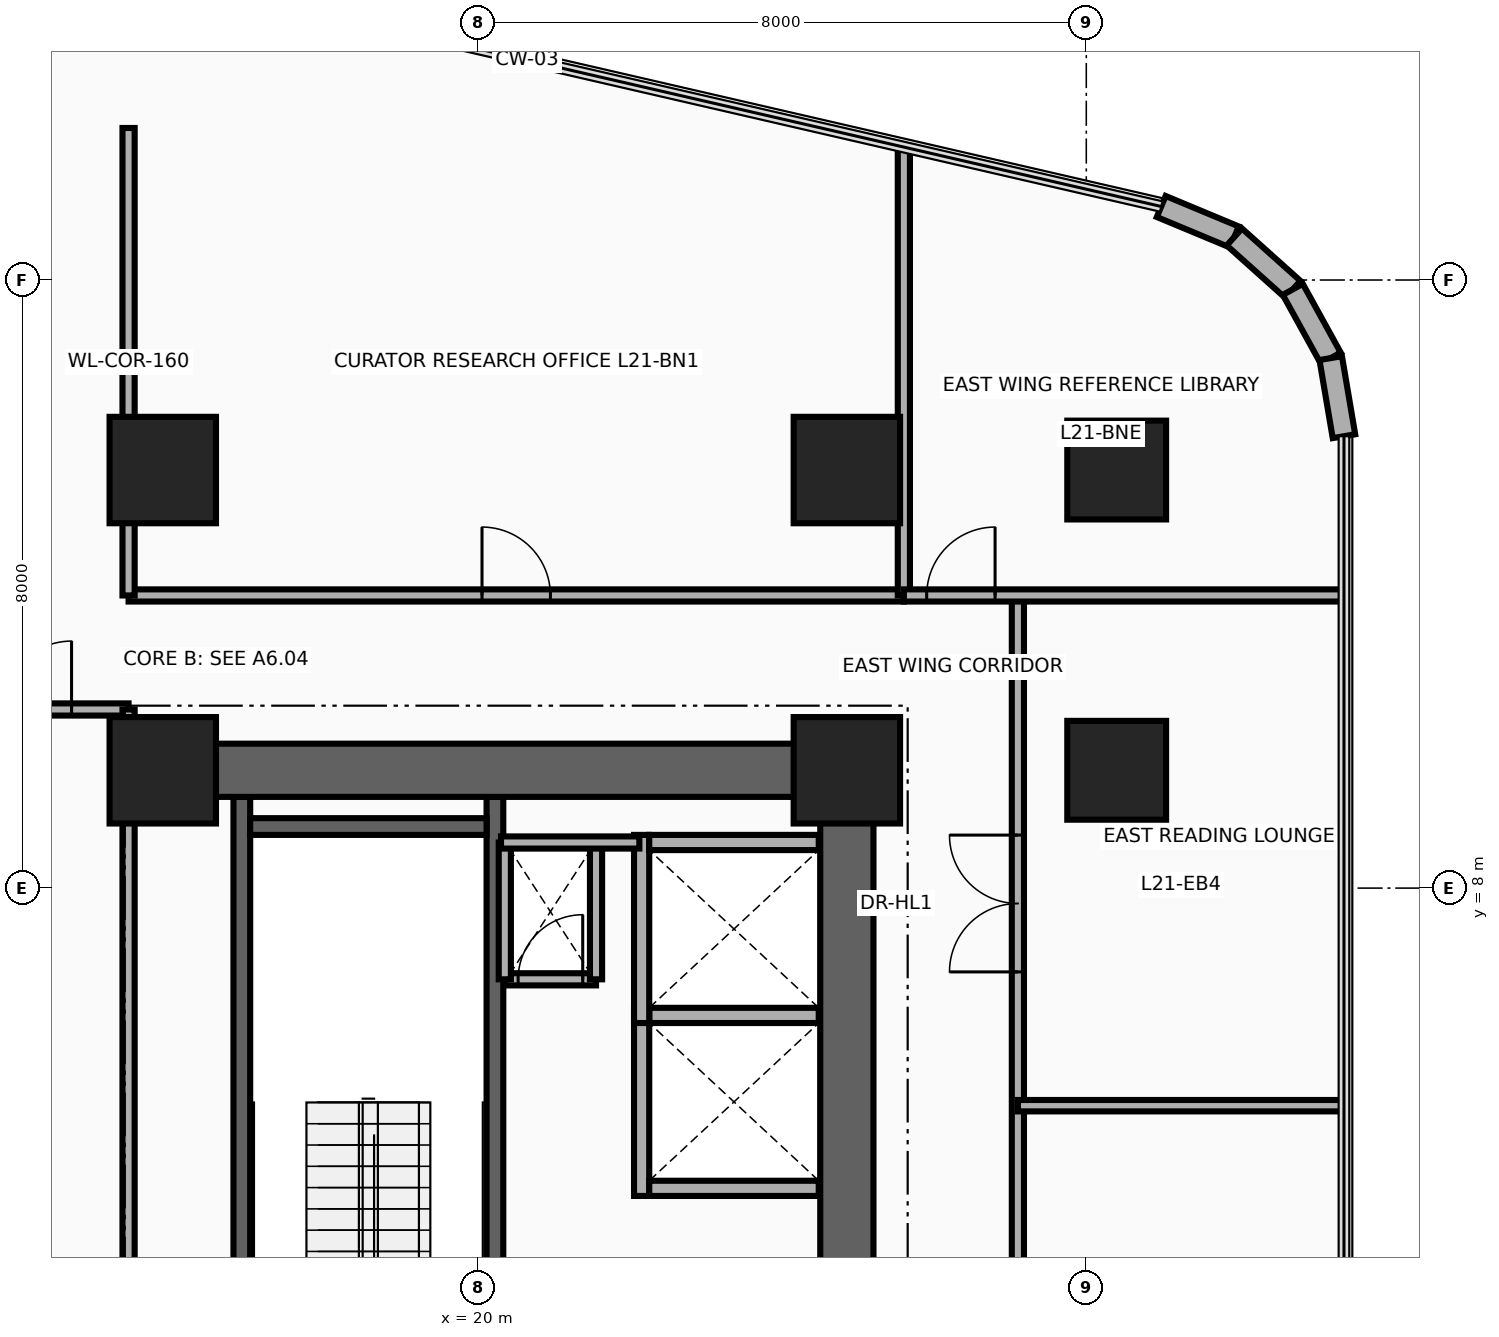
"""IFC4 building model, lengths in metres.
Left out: names, types, materials, properties, quantities, classifications, styles, units other than length and angle.
Written with IfcOpenShell. Run it as: python <this file> out.ifc"""

import sys

from ifc_helpers import new_model, si_unit, direction, frame, frame_2d, origin, origin_2d, place, context, subcontext, project, spatial, rectangle, circle, extrude, source, transform, mapped, element, fill, save


model = new_model("IFC4")
c1 = context("Model", 3, precision=1e-05, world=origin(), true_north=direction((0.0, 1.0)))
c2 = subcontext(c1, "Body", "Model", "MODEL_VIEW")
j1 = project(units=[si_unit("LENGTHUNIT", "METRE"), si_unit("PLANEANGLEUNIT", "RADIAN")], contexts=[c1])
p1 = place(None, origin())
s1 = spatial("IfcSite", under=j1, at=p1, CompositionType="ELEMENT")
p2 = place(p1, origin())
s2 = spatial("IfcBuilding", under=s1, at=p2, CompositionType="ELEMENT")
p3 = place(p2, frame((0.0, 0.0, 85.2)))
s3 = spatial("IfcBuildingStorey", under=s2, at=p3, CompositionType="ELEMENT", Elevation=85.2)
for number, where, z_axis, x_axis in (
    (1, (16.89, 0.68, 0.0), (0.0, 0.0, 1.0), (0.0, 1.0, 0.0)),
    (2, (20.22, 0.68, 0.0), (0.0, 0.0, 1.0), (0.0, 1.0, 0.0)),
):
    element("IfcWall", number, at=place(p3, frame(where, z_axis=z_axis, x_axis=x_axis)), inside=s3, PredefinedType="SHEAR", context=c2, shape_type="SweptSolid", body=[
        extrude(rectangle(XDim=8.52, YDim=0.22, at=frame_2d((4.26, 0.0))), origin(), (0.0, 0.0, 1.0), 3.46),
    ])
p4 = place(p3, frame((17.0, 8.81, 0.0), z_axis=(0.0, 0.0, 1.0), x_axis=(1.0, 0.0, 0.0)))
e3 = element("IfcWall", 3, at=p4, inside=s3, PredefinedType="SHEAR", context=c2, shape_type="SweptSolid", body=[
    extrude(rectangle(XDim=3.11, YDim=0.22, at=frame_2d((1.555, 0.0))), origin(), (0.0, 0.0, 1.0), 3.46),
])
p5 = place(p3, frame((24.85, 0.95, 0.0), z_axis=(0.0, 0.0, 1.0), x_axis=(0.0, 1.0, 0.0)))
e4 = element("IfcWall", 4, at=p5, inside=s3, PredefinedType="SHEAR", context=c2, shape_type="SweptSolid", body=[
    extrude(rectangle(XDim=8.95, YDim=0.7, at=frame_2d((4.475, 0.0))), origin(), (0.0, 0.0, 1.0), 3.46),
])
p6 = place(p3, frame((15.85, 9.55, 0.0), z_axis=(0.0, 0.0, 1.0), x_axis=(1.0, 0.0, 0.0)))
e5 = element("IfcWall", 5, at=p6, inside=s3, PredefinedType="SHEAR", context=c2, shape_type="SweptSolid", body=[
    extrude(rectangle(XDim=9.0, YDim=0.7, at=frame_2d((4.5, 0.0))), origin(), (0.0, 0.0, 1.0), 3.46),
])
m1 = source(origin(), c2, "Body", "SweptSolid", [
    extrude(rectangle(XDim=1.4, YDim=1.4, at=origin_2d()), origin(), (0.0, 0.0, 1.0), 3.7),
])
for number, where, z_axis, x_axis in (
    (6, (15.85, 9.55, 0.0), (0.0, 0.0, 1.0), (1.0, 0.0, 0.0)),
    (7, (24.85, 9.55, 0.0), (0.0, 0.0, 1.0), (1.0, 0.0, 0.0)),
):
    element("IfcColumn", number, at=place(p3, frame(where, z_axis=z_axis, x_axis=x_axis)), inside=s3, PredefinedType="COLUMN", context=c2, shape_type="MappedRepresentation", body=[
        mapped(m1, transform((0.0, 0.0, 0.0), x_axis=(1.0, 0.0, 0.0), y_axis=(0.0, 1.0, 0.0), z_axis=(0.0, 0.0, 1.0), scale=1.0)),
    ])
m2 = source(origin(), c2, "Body", "SweptSolid", [
    extrude(circle(Radius=0.65, at=origin_2d()), origin(), (0.0, 0.0, 1.0), 3.7),
])
p7 = place(p3, frame((28.4, 9.55, 0.0), z_axis=(0.0, 0.0, 1.0), x_axis=(1.0, 0.0, 0.0)))
e8 = element("IfcColumn", 8, at=p7, inside=s3, PredefinedType="COLUMN", context=c2, shape_type="MappedRepresentation", body=[
    mapped(m2, transform((0.0, 0.0, 0.0), x_axis=(1.0, 0.0, 0.0), y_axis=(0.0, 1.0, 0.0), z_axis=(0.0, 0.0, 1.0), scale=1.0)),
])
for number, where, z_axis, x_axis in (
    (9, (15.85, 13.5, 0.0), (0.0, 0.0, 1.0), (1.0, 0.0, 0.0)),
    (10, (24.85, 13.5, 0.0), (0.0, 0.0, 1.0), (1.0, 0.0, 0.0)),
):
    element("IfcColumn", number, at=place(p3, frame(where, z_axis=z_axis, x_axis=x_axis)), inside=s3, PredefinedType="COLUMN", context=c2, shape_type="MappedRepresentation", body=[
        mapped(m1, transform((0.0, 0.0, 0.0), x_axis=(1.0, 0.0, 0.0), y_axis=(0.0, 1.0, 0.0), z_axis=(0.0, 0.0, 1.0), scale=1.0)),
    ])
p8 = place(p3, frame((28.4, 13.5, 0.0), z_axis=(0.0, 0.0, 1.0), x_axis=(1.0, 0.0, 0.0)))
e11 = element("IfcColumn", 11, at=p8, inside=s3, PredefinedType="COLUMN", context=c2, shape_type="MappedRepresentation", body=[
    mapped(m2, transform((0.0, 0.0, 0.0), x_axis=(1.0, 0.0, 0.0), y_axis=(0.0, 1.0, 0.0), z_axis=(0.0, 0.0, 1.0), scale=1.0)),
])
p9 = place(p3, frame((28.986, 16.967, 0.0), z_axis=(0.0, 0.0, 1.0), x_axis=(0.923083852684, -0.384598753136, 0.0)))
e12 = element("IfcWall", 12, at=p9, inside=s3, PredefinedType="SOLIDWALL", context=c2, shape_type="SweptSolid", body=[
    extrude(rectangle(XDim=1.042, YDim=0.3, at=frame_2d((0.521, 0.0))), origin(), (0.0, 0.0, 1.0), 3.46),
])
p10 = place(p3, frame((29.948, 16.566, 0.0), z_axis=(0.0, 0.0, 1.0), x_axis=(0.744585645533, -0.66752694063, 0.0)))
e13 = element("IfcWall", 13, at=p10, inside=s3, PredefinedType="SOLIDWALL", context=c2, shape_type="SweptSolid", body=[
    extrude(rectangle(XDim=1.033, YDim=0.3, at=frame_2d((0.517, 0.0))), origin(), (0.0, 0.0, 1.0), 3.46),
])
p11 = place(p3, frame((30.717, 15.877, 0.0), z_axis=(0.0, 0.0, 1.0), x_axis=(0.482971098131, -0.875636293429, 0.0)))
e14 = element("IfcWall", 14, at=p11, inside=s3, PredefinedType="SOLIDWALL", context=c2, shape_type="SweptSolid", body=[
    extrude(rectangle(XDim=1.033, YDim=0.3, at=frame_2d((0.516, 0.0))), origin(), (0.0, 0.0, 1.0), 3.46),
])
p12 = place(p3, frame((31.216, 14.973, 0.0), z_axis=(0.0, 0.0, 1.0), x_axis=(0.167019462117, -0.985953598946, 0.0)))
e15 = element("IfcWall", 15, at=p12, inside=s3, PredefinedType="SOLIDWALL", context=c2, shape_type="SweptSolid", body=[
    extrude(rectangle(XDim=1.042, YDim=0.3, at=frame_2d((0.521, 0.0))), origin(), (0.0, 0.0, 1.0), 3.46),
])
p13 = place(p3, frame((22.15, 3.95, 0.0), z_axis=(0.0, 0.0, 1.0), x_axis=(0.0, 1.0, 0.0)))
e16 = element("IfcWall", 16, at=p13, inside=s3, PredefinedType="MOVABLE", context=c2, shape_type="SweptSolid", body=[
    extrude(rectangle(XDim=2.475, YDim=0.2, at=frame_2d((1.238, 0.0))), origin(), (0.0, 0.0, 1.0), 3.46),
])
for number, where, z_axis, x_axis in (
    (17, (22.25, 4.05, 0.0), (0.0, 0.0, 1.0), (1.0, 0.0, 0.0)),
    (18, (22.25, 6.325, 0.0), (0.0, 0.0, 1.0), (1.0, 0.0, 0.0)),
):
    element("IfcWall", number, at=place(p3, frame(where, z_axis=z_axis, x_axis=x_axis)), inside=s3, PredefinedType="MOVABLE", context=c2, shape_type="SweptSolid", body=[
        extrude(rectangle(XDim=2.23, YDim=0.2, at=frame_2d((1.115, 0.0))), origin(), (0.0, 0.0, 1.0), 2.245),
    ])
p14 = place(p3, frame((22.15, 6.225, 0.0), z_axis=(0.0, 0.0, 1.0), x_axis=(0.0, 1.0, 0.0)))
e19 = element("IfcWall", 19, at=p14, inside=s3, PredefinedType="MOVABLE", context=c2, shape_type="SweptSolid", body=[
    extrude(rectangle(XDim=2.475, YDim=0.2, at=frame_2d((1.237, 0.0))), origin(), (0.0, 0.0, 1.0), 3.46),
])
p15 = place(p3, frame((22.25, 8.6, 0.0), z_axis=(0.0, 0.0, 1.0), x_axis=(1.0, 0.0, 0.0)))
e20 = element("IfcWall", 20, at=p15, inside=s3, PredefinedType="MOVABLE", context=c2, shape_type="SweptSolid", body=[
    extrude(rectangle(XDim=2.23, YDim=0.2, at=frame_2d((1.115, 0.0))), origin(), (0.0, 0.0, 1.0), 2.245),
])
p16 = place(p3, frame((20.35, 6.8, 0.0), z_axis=(0.0, 0.0, 1.0), x_axis=(1.0, 0.0, 0.0)))
e21 = element("IfcWall", 21, at=p16, inside=s3, PredefinedType="PARTITIONING", context=c2, shape_type="SweptSolid", body=[
    extrude(rectangle(XDim=1.2, YDim=0.16, at=frame_2d((0.6, 0.0))), origin(), (0.0, 0.0, 1.0), 3.46),
])
p17 = place(p16, frame((0.175, 0.0, 0.0)))
e22 = element("IfcOpeningElement", 22, at=p17, cuts=e21, PredefinedType="OPENING", context=c2, shape_type="SweptSolid", body=[
    extrude(rectangle(XDim=0.85, YDim=2.05, at=frame_2d((0.425, 1.025))), frame((0.0, 0.095, 0.0), z_axis=(0.0, -1.0, 0.0), x_axis=(1.0, 0.0, 0.0)), (0.0, 0.0, 1.0), 0.19),
])
for number, where, z_axis, x_axis in (
    (23, (21.55, 6.8, 0.0), (0.0, 0.0, 1.0), (0.0, 1.0, 0.0)),
    (24, (20.35, 6.8, 0.0), (0.0, 0.0, 1.0), (0.0, 1.0, 0.0)),
):
    element("IfcWall", number, at=place(p3, frame(where, z_axis=z_axis, x_axis=x_axis)), inside=s3, PredefinedType="PARTITIONING", context=c2, shape_type="SweptSolid", body=[
        extrude(rectangle(XDim=1.8, YDim=0.16, at=frame_2d((0.9, 0.0))), origin(), (0.0, 0.0, 1.0), 3.46),
    ])
p18 = place(p3, frame((20.3, 8.6, 0.0), z_axis=(0.0, 0.0, 1.0), x_axis=(1.0, 0.0, 0.0)))
e25 = element("IfcWall", 25, at=p18, inside=s3, PredefinedType="PARTITIONING", context=c2, shape_type="SweptSolid", body=[
    extrude(rectangle(XDim=1.82, YDim=0.16, at=frame_2d((0.91, 0.0))), origin(), (0.0, 0.0, 1.0), 3.46),
])
p19 = place(p3, frame((15.4, 11.85, 0.0), z_axis=(0.0, 0.0, 1.0), x_axis=(1.0, 0.0, 0.0)))
e26 = element("IfcWall", 26, at=p19, inside=s3, PredefinedType="PARTITIONING", context=c2, shape_type="SweptSolid", body=[
    extrude(rectangle(XDim=10.2, YDim=0.16, at=frame_2d((5.1, 0.0))), origin(), (0.0, 0.0, 1.0), 2.834),
])
p20 = place(p19, frame((4.65, 0.0, 0.0)))
e27 = element("IfcOpeningElement", 27, at=p20, cuts=e26, PredefinedType="OPENING", context=c2, shape_type="SweptSolid", body=[
    extrude(rectangle(XDim=0.9, YDim=2.1, at=frame_2d((0.45, 1.05))), frame((0.0, 0.095, 0.0), z_axis=(0.0, -1.0, 0.0), x_axis=(1.0, 0.0, 0.0)), (0.0, 0.0, 1.0), 0.19),
])
p21 = place(p3, frame((15.4, 11.85, 0.0), z_axis=(0.0, 0.0, 1.0), x_axis=(0.0, 1.0, 0.0)))
e28 = element("IfcWall", 28, at=p21, inside=s3, PredefinedType="PARTITIONING", context=c2, shape_type="SweptSolid", body=[
    extrude(rectangle(XDim=6.15, YDim=0.16, at=frame_2d((3.075, 0.0))), origin(), (0.0, 0.0, 1.0), 2.583),
])
p22 = place(p3, frame((25.6, 11.85, 0.0), z_axis=(0.0, 0.0, 1.0), x_axis=(0.0, 1.0, 0.0)))
e29 = element("IfcWall", 29, at=p22, inside=s3, PredefinedType="PARTITIONING", context=c2, shape_type="SweptSolid", body=[
    extrude(rectangle(XDim=5.898, YDim=0.16, at=frame_2d((2.949, 0.0))), origin(), (0.0, 0.0, 1.0), 2.583),
])
p23 = place(p3, frame((27.1, -13.89, 0.0), z_axis=(0.0, 0.0, 1.0), x_axis=(0.0, 1.0, 0.0)))
e30 = element("IfcWall", 30, at=p23, inside=s3, PredefinedType="PARTITIONING", context=c2, shape_type="SweptSolid", body=[
    extrude(rectangle(XDim=25.74, YDim=0.16, at=frame_2d((12.87, 0.0))), origin(), (0.0, 0.0, 1.0), 2.583),
])
p24 = place(p23, frame((2.351, 0.0, 0.0)))
e31 = element("IfcOpeningElement", 31, at=p24, cuts=e30, PredefinedType="OPENING", context=c2, shape_type="SweptSolid", body=[
    extrude(rectangle(XDim=0.9, YDim=2.1, at=frame_2d((0.45, 1.05))), frame((0.0, 0.095, 0.0), z_axis=(0.0, -1.0, 0.0), x_axis=(1.0, 0.0, 0.0)), (0.0, 0.0, 1.0), 0.19),
])
p25 = place(p23, frame((8.059, 0.0, 0.0)))
e32 = element("IfcOpeningElement", 32, at=p25, cuts=e30, PredefinedType="OPENING", context=c2, shape_type="SweptSolid", body=[
    extrude(rectangle(XDim=1.8, YDim=2.15, at=frame_2d((0.9, 1.075))), frame((0.0, 0.095, 0.0), z_axis=(0.0, -1.0, 0.0), x_axis=(1.0, 0.0, 0.0)), (0.0, 0.0, 1.0), 0.19),
])
p26 = place(p23, frame((14.771, 0.0, 0.0)))
e33 = element("IfcOpeningElement", 33, at=p26, cuts=e30, PredefinedType="OPENING", context=c2, shape_type="SweptSolid", body=[
    extrude(rectangle(XDim=1.8, YDim=2.15, at=frame_2d((0.9, 1.075))), frame((0.0, 0.095, 0.0), z_axis=(0.0, -1.0, 0.0), x_axis=(1.0, 0.0, 0.0)), (0.0, 0.0, 1.0), 0.19),
])
p27 = place(p23, frame((20.788, 0.0, 0.0)))
e34 = element("IfcOpeningElement", 34, at=p27, cuts=e30, PredefinedType="OPENING", context=c2, shape_type="SweptSolid", body=[
    extrude(rectangle(XDim=1.8, YDim=2.15, at=frame_2d((0.9, 1.075))), frame((0.0, 0.095, 0.0), z_axis=(0.0, -1.0, 0.0), x_axis=(1.0, 0.0, 0.0)), (0.0, 0.0, 1.0), 0.19),
])
p28 = place(p3, frame((25.6, 11.85, 0.0), z_axis=(0.0, 0.0, 1.0), x_axis=(1.0, 0.0, 0.0)))
e35 = element("IfcWall", 35, at=p28, inside=s3, PredefinedType="PARTITIONING", context=c2, shape_type="SweptSolid", body=[
    extrude(rectangle(XDim=5.79, YDim=0.16, at=frame_2d((2.895, 0.0))), origin(), (0.0, 0.0, 1.0), 2.896),
])
p29 = place(p28, frame((0.3, 0.0, 0.0)))
e36 = element("IfcOpeningElement", 36, at=p29, cuts=e35, PredefinedType="OPENING", context=c2, shape_type="SweptSolid", body=[
    extrude(rectangle(XDim=0.9, YDim=2.1, at=frame_2d((0.45, 1.05))), frame((0.0, 0.095, 0.0), z_axis=(0.0, -1.0, 0.0), x_axis=(1.0, 0.0, 0.0)), (0.0, 0.0, 1.0), 0.19),
])
p30 = place(p3, frame((27.1, 5.137, 0.0), z_axis=(0.0, 0.0, 1.0), x_axis=(1.0, 0.0, 0.0)))
e37 = element("IfcWall", 37, at=p30, inside=s3, PredefinedType="PARTITIONING", context=c2, shape_type="SweptSolid", body=[
    extrude(rectangle(XDim=4.29, YDim=0.15, at=frame_2d((2.145, 0.0))), origin(), (0.0, 0.0, 1.0), 2.896),
])
p31 = place(p3, frame((13.3, 10.35, 0.0), z_axis=(0.0, 0.0, 1.0), x_axis=(1.0, 0.0, 0.0)))
e38 = element("IfcWall", 38, at=p31, inside=s3, PredefinedType="PARTITIONING", context=c2, shape_type="SweptSolid", body=[
    extrude(rectangle(XDim=2.1, YDim=0.16, at=frame_2d((1.05, 0.0))), origin(), (0.0, 0.0, 1.0), 2.583),
])
p32 = place(p31, frame((0.45, 0.0, 0.0)))
e39 = element("IfcOpeningElement", 39, at=p32, cuts=e38, PredefinedType="OPENING", context=c2, shape_type="SweptSolid", body=[
    extrude(rectangle(XDim=0.9, YDim=2.1, at=frame_2d((0.45, 1.05))), frame((0.0, 0.095, 0.0), z_axis=(0.0, -1.0, 0.0), x_axis=(1.0, 0.0, 0.0)), (0.0, 0.0, 1.0), 0.19),
])
p33 = place(p3, frame((15.4, 1.0, 0.0), z_axis=(0.0, 0.0, 1.0), x_axis=(0.0, 1.0, 0.0)))
e40 = element("IfcWall", 40, at=p33, inside=s3, PredefinedType="PARTITIONING", context=c2, shape_type="SweptSolid", body=[
    extrude(rectangle(XDim=9.35, YDim=0.16, at=frame_2d((4.675, 0.0))), origin(), (0.0, 0.0, 1.0), 2.245),
])
p34 = place(p17, origin())
e41 = element("IfcDoor", 41, at=p34, inside=s3, OperationType="SINGLE_SWING_LEFT", PredefinedType="DOOR", context=c2, shape_type="SweptSolid", body=[
    extrude(rectangle(XDim=0.85, YDim=2.05, at=frame_2d((0.425, 1.025))), frame((0.0, 0.025, 0.0), z_axis=(0.0, -1.0, 0.0), x_axis=(1.0, 0.0, 0.0)), (0.0, 0.0, 1.0), 0.05),
])
fill(e22, e41)
p35 = place(p20, origin())
e42 = element("IfcDoor", 42, at=p35, inside=s3, OperationType="SINGLE_SWING_RIGHT", PredefinedType="DOOR", context=c2, shape_type="SweptSolid", body=[
    extrude(rectangle(XDim=0.9, YDim=2.1, at=frame_2d((0.45, 1.05))), frame((0.0, 0.025, 0.0), z_axis=(0.0, -1.0, 0.0), x_axis=(1.0, 0.0, 0.0)), (0.0, 0.0, 1.0), 0.05),
])
fill(e27, e42)
p36 = place(p29, origin())
e43 = element("IfcDoor", 43, at=p36, inside=s3, OperationType="SINGLE_SWING_RIGHT", PredefinedType="DOOR", context=c2, shape_type="SweptSolid", body=[
    extrude(rectangle(XDim=0.9, YDim=2.1, at=frame_2d((0.45, 1.05))), frame((0.0, 0.025, 0.0), z_axis=(0.0, -1.0, 0.0), x_axis=(1.0, 0.0, 0.0)), (0.0, 0.0, 1.0), 0.05),
])
fill(e36, e43)
p37 = place(p27, origin())
e44 = element("IfcDoor", 44, at=p37, inside=s3, OperationType="DOUBLE_DOOR_SINGLE_SWING", PredefinedType="DOOR", context=c2, shape_type="SweptSolid", body=[
    extrude(rectangle(XDim=1.8, YDim=2.15, at=frame_2d((0.9, 1.075))), frame((0.0, 0.025, 0.0), z_axis=(0.0, -1.0, 0.0), x_axis=(1.0, 0.0, 0.0)), (0.0, 0.0, 1.0), 0.05),
])
fill(e34, e44)
p38 = place(p32, origin())
e45 = element("IfcDoor", 45, at=p38, inside=s3, OperationType="SINGLE_SWING_LEFT", PredefinedType="DOOR", context=c2, shape_type="SweptSolid", body=[
    extrude(rectangle(XDim=0.9, YDim=2.1, at=frame_2d((0.45, 1.05))), frame((0.0, 0.025, 0.0), z_axis=(0.0, -1.0, 0.0), x_axis=(1.0, 0.0, 0.0)), (0.0, 0.0, 1.0), 0.05),
])
fill(e39, e45)
save(model, sys.argv[1])
